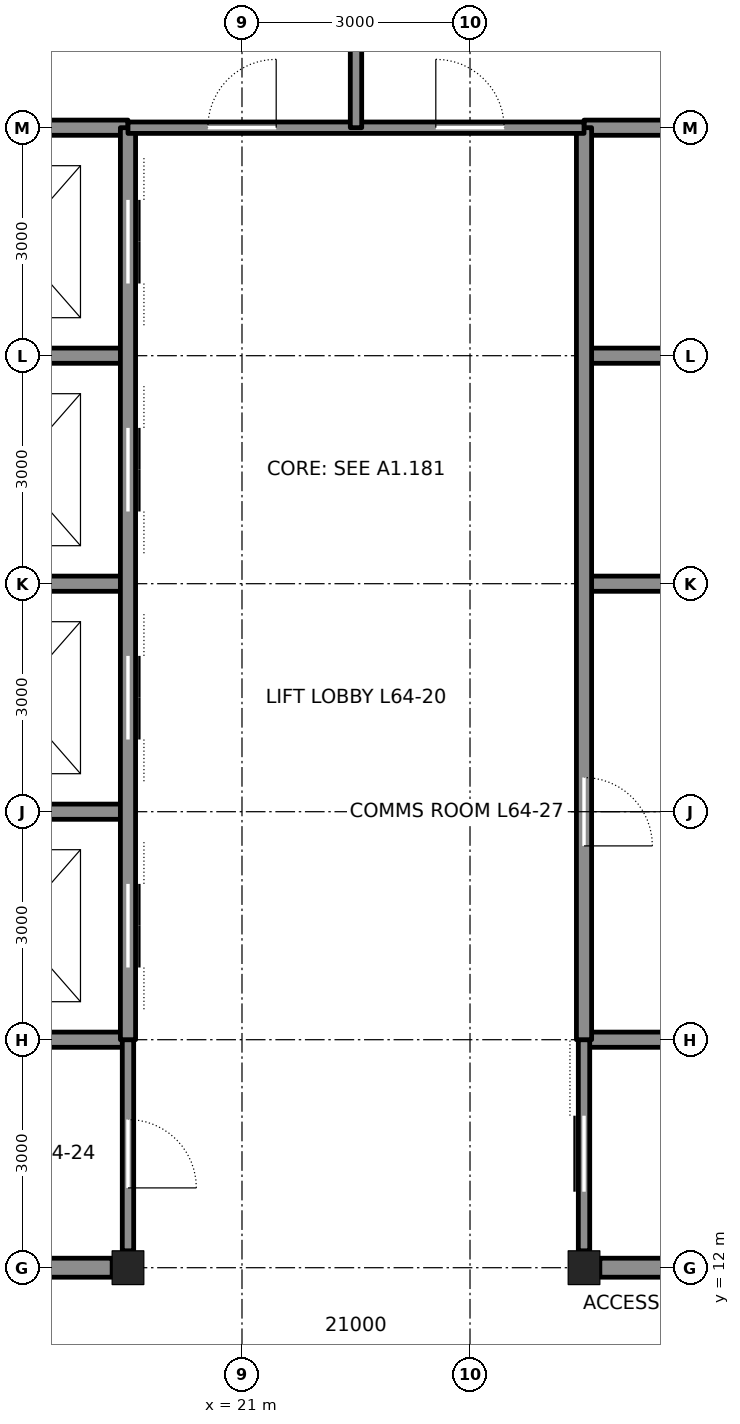
"""IFC4 building model, lengths in metres.
Left out: names, types, materials, properties, quantities, classifications, styles, units other than length and angle.
Written with IfcOpenShell. Run it as: python <this file> out.ifc"""

import sys

from ifc_helpers import new_model, si_unit, direction, frame, frame_2d, origin, origin_2d, place, context, subcontext, project, spatial, rectangle, i_section, extrude, element, fill, save


model = new_model("IFC4")
c1 = context("Model", 3, precision=1e-05, world=origin(), true_north=direction((0.0, 1.0)))
c2 = subcontext(c1, "Body", "Model", "MODEL_VIEW")
j1 = project(units=[si_unit("LENGTHUNIT", "METRE"), si_unit("PLANEANGLEUNIT", "RADIAN")], contexts=[c1])
p1 = place(None, origin())
s1 = spatial("IfcSite", under=j1, at=p1, CompositionType="ELEMENT")
p2 = place(p1, origin())
s2 = spatial("IfcBuilding", under=s1, at=p2, CompositionType="ELEMENT")
p3 = place(p2, frame((0.0, 0.0, 287.4)))
s3 = spatial("IfcBuildingStorey", under=s2, at=p3, CompositionType="ELEMENT", Elevation=287.4)
for number, where, z_axis, x_axis in (
    (1, (19.5, 12.0, 0.0), (0.0, 0.0, 1.0), (1.0, 0.0, 0.0)),
    (2, (25.5, 12.0, 0.0), (0.0, 0.0, 1.0), (1.0, 0.0, 0.0)),
):
    element("IfcColumn", number, at=place(p3, frame(where, z_axis=z_axis, x_axis=x_axis)), inside=s3, PredefinedType="COLUMN", context=c2, shape_type="SweptSolid", body=[
        extrude(i_section(OverallWidth=0.417, OverallDepth=0.445, WebThickness=0.039, FlangeThickness=0.063, at=origin_2d()), origin(), (0.0, 0.0, 1.0), 4.2),
    ])
for number, where, z_axis, x_axis in (
    (3, (16.708, 12.0, 0.0), (0.0, 0.0, 1.0), (1.0, 0.0, 0.0)),
    (4, (25.708, 12.0, 0.0), (0.0, 0.0, 1.0), (1.0, 0.0, 0.0)),
):
    element("IfcWall", number, at=place(p3, frame(where, z_axis=z_axis, x_axis=x_axis)), inside=s3, PredefinedType="SOLIDWALL", context=c2, shape_type="SweptSolid", body=[
        extrude(rectangle(XDim=2.583, YDim=0.25, at=frame_2d((1.292, 0.0))), origin(), (0.0, 0.0, 1.0), 3.182),
    ])
for number, where, z_axis, x_axis in (
    (5, (12.0, 15.0, 0.0), (0.0, 0.0, 1.0), (1.0, 0.0, 0.0)),
    (6, (25.5, 15.0, 0.0), (0.0, 0.0, 1.0), (1.0, 0.0, 0.0)),
):
    element("IfcWall", number, at=place(p3, frame(where, z_axis=z_axis, x_axis=x_axis)), inside=s3, PredefinedType="SOLIDWALL", context=c2, shape_type="SweptSolid", body=[
        extrude(rectangle(XDim=7.5, YDim=0.2, at=frame_2d((3.75, 0.0))), origin(), (0.0, 0.0, 1.0), 4.04),
    ])
for number, where, z_axis, x_axis in (
    (7, (16.708, 24.0, 0.0), (0.0, 0.0, 1.0), (1.0, 0.0, 0.0)),
    (8, (25.5, 24.0, 0.0), (0.0, 0.0, 1.0), (1.0, 0.0, 0.0)),
):
    element("IfcWall", number, at=place(p3, frame(where, z_axis=z_axis, x_axis=x_axis)), inside=s3, PredefinedType="SOLIDWALL", context=c2, shape_type="SweptSolid", body=[
        extrude(rectangle(XDim=2.792, YDim=0.2, at=frame_2d((1.396, 0.0))), origin(), (0.0, 0.0, 1.0), 3.09),
    ])
p4 = place(p3, frame((12.0, 27.0, 0.0), z_axis=(0.0, 0.0, 1.0), x_axis=(1.0, 0.0, 0.0)))
e9 = element("IfcWall", 9, at=p4, inside=s3, PredefinedType="SOLIDWALL", context=c2, shape_type="SweptSolid", body=[
    extrude(rectangle(XDim=7.5, YDim=0.2, at=frame_2d((3.75, 0.0))), origin(), (0.0, 0.0, 1.0), 4.04),
])
p5 = place(p4, frame((1.65, 0.0, 0.0)))
e10 = element("IfcOpeningElement", 10, at=p5, cuts=e9, PredefinedType="OPENING", context=c2, shape_type="SweptSolid", body=[
    extrude(rectangle(XDim=1.2, YDim=2.1, at=frame_2d((0.6, 1.05))), frame((0.0, 0.11, 0.0), z_axis=(0.0, -1.0, 0.0), x_axis=(1.0, 0.0, 0.0)), (0.0, 0.0, 1.0), 0.22),
])
for number, where, z_axis, x_axis in (
    (11, (25.5, 27.0, 0.0), (0.0, 0.0, 1.0), (1.0, 0.0, 0.0)),
    (12, (16.5, 18.0, 0.0), (0.0, 0.0, 1.0), (1.0, 0.0, 0.0)),
):
    element("IfcWall", number, at=place(p3, frame(where, z_axis=z_axis, x_axis=x_axis)), inside=s3, PredefinedType="SOLIDWALL", context=c2, shape_type="SweptSolid", body=[
        extrude(rectangle(XDim=3.0, YDim=0.2, at=frame_2d((1.5, 0.0))), origin(), (0.0, 0.0, 1.0), 4.04),
    ])
for number, where, z_axis, x_axis in (
    (13, (16.708, 21.0, 0.0), (0.0, 0.0, 1.0), (1.0, 0.0, 0.0)),
    (14, (25.5, 21.0, 0.0), (0.0, 0.0, 1.0), (1.0, 0.0, 0.0)),
):
    element("IfcWall", number, at=place(p3, frame(where, z_axis=z_axis, x_axis=x_axis)), inside=s3, PredefinedType="SOLIDWALL", context=c2, shape_type="SweptSolid", body=[
        extrude(rectangle(XDim=2.792, YDim=0.2, at=frame_2d((1.396, 0.0))), origin(), (0.0, 0.0, 1.0), 3.09),
    ])
p6 = place(p3, frame((19.5, 12.222, 0.0), z_axis=(0.0, 0.0, 1.0), x_axis=(0.0, 1.0, 0.0)))
e15 = element("IfcWall", 15, at=p6, inside=s3, PredefinedType="PARTITIONING", context=c2, shape_type="SweptSolid", body=[
    extrude(rectangle(XDim=2.778, YDim=0.15, at=frame_2d((1.389, 0.0))), origin(), (0.0, 0.0, 1.0), 3.065),
])
p7 = place(p6, frame((0.828, 0.0, 0.0)))
e16 = element("IfcOpeningElement", 16, at=p7, cuts=e15, PredefinedType="OPENING", context=c2, shape_type="SweptSolid", body=[
    extrude(rectangle(XDim=0.9, YDim=2.1, at=frame_2d((0.45, 1.05))), frame((0.0, 0.085, 0.0), z_axis=(0.0, -1.0, 0.0), x_axis=(1.0, 0.0, 0.0)), (0.0, 0.0, 1.0), 0.17),
])
p8 = place(p3, frame((19.5, 15.0, 0.0), z_axis=(0.0, 0.0, 1.0), x_axis=(0.0, 1.0, 0.0)))
e17 = element("IfcWall", 17, at=p8, inside=s3, PredefinedType="SOLIDWALL", context=c2, shape_type="SweptSolid", body=[
    extrude(rectangle(XDim=12.0, YDim=0.2, at=frame_2d((6.0, 0.0))), origin(), (0.0, 0.0, 1.0), 3.065),
])
p9 = place(p8, frame((0.95, 0.0, 0.0)))
e18 = element("IfcOpeningElement", 18, at=p9, cuts=e17, PredefinedType="OPENING", context=c2, shape_type="SweptSolid", body=[
    extrude(rectangle(XDim=1.1, YDim=2.1, at=frame_2d((0.55, 1.05))), frame((0.0, 0.11, 0.0), z_axis=(0.0, -1.0, 0.0), x_axis=(1.0, 0.0, 0.0)), (0.0, 0.0, 1.0), 0.22),
])
p10 = place(p8, frame((3.95, 0.0, 0.0)))
e19 = element("IfcOpeningElement", 19, at=p10, cuts=e17, PredefinedType="OPENING", context=c2, shape_type="SweptSolid", body=[
    extrude(rectangle(XDim=1.1, YDim=2.1, at=frame_2d((0.55, 1.05))), frame((0.0, 0.11, 0.0), z_axis=(0.0, -1.0, 0.0), x_axis=(1.0, 0.0, 0.0)), (0.0, 0.0, 1.0), 0.22),
])
p11 = place(p8, frame((6.95, 0.0, 0.0)))
e20 = element("IfcOpeningElement", 20, at=p11, cuts=e17, PredefinedType="OPENING", context=c2, shape_type="SweptSolid", body=[
    extrude(rectangle(XDim=1.1, YDim=2.1, at=frame_2d((0.55, 1.05))), frame((0.0, 0.11, 0.0), z_axis=(0.0, -1.0, 0.0), x_axis=(1.0, 0.0, 0.0)), (0.0, 0.0, 1.0), 0.22),
])
p12 = place(p8, frame((9.95, 0.0, 0.0)))
e21 = element("IfcOpeningElement", 21, at=p12, cuts=e17, PredefinedType="OPENING", context=c2, shape_type="SweptSolid", body=[
    extrude(rectangle(XDim=1.1, YDim=2.1, at=frame_2d((0.55, 1.05))), frame((0.0, 0.11, 0.0), z_axis=(0.0, -1.0, 0.0), x_axis=(1.0, 0.0, 0.0)), (0.0, 0.0, 1.0), 0.22),
])
p13 = place(p3, frame((25.5, 12.222, 0.0), z_axis=(0.0, 0.0, 1.0), x_axis=(0.0, 1.0, 0.0)))
e22 = element("IfcWall", 22, at=p13, inside=s3, PredefinedType="PARTITIONING", context=c2, shape_type="SweptSolid", body=[
    extrude(rectangle(XDim=2.778, YDim=0.15, at=frame_2d((1.389, 0.0))), origin(), (0.0, 0.0, 1.0), 3.065),
])
p14 = place(p13, frame((0.778, 0.0, 0.0)))
e23 = element("IfcOpeningElement", 23, at=p14, cuts=e22, PredefinedType="OPENING", context=c2, shape_type="SweptSolid", body=[
    extrude(rectangle(XDim=1.0, YDim=2.1, at=frame_2d((0.5, 1.05))), frame((0.0, 0.085, 0.0), z_axis=(0.0, -1.0, 0.0), x_axis=(1.0, 0.0, 0.0)), (0.0, 0.0, 1.0), 0.17),
])
p15 = place(p3, frame((25.5, 15.0, 0.0), z_axis=(0.0, 0.0, 1.0), x_axis=(0.0, 1.0, 0.0)))
e24 = element("IfcWall", 24, at=p15, inside=s3, PredefinedType="SOLIDWALL", context=c2, shape_type="SweptSolid", body=[
    extrude(rectangle(XDim=12.0, YDim=0.2, at=frame_2d((6.0, 0.0))), origin(), (0.0, 0.0, 1.0), 3.065),
])
p16 = place(p15, frame((2.55, 0.0, 0.0)))
e25 = element("IfcOpeningElement", 25, at=p16, cuts=e24, PredefinedType="OPENING", context=c2, shape_type="SweptSolid", body=[
    extrude(rectangle(XDim=0.9, YDim=2.1, at=frame_2d((0.45, 1.05))), frame((0.0, 0.11, 0.0), z_axis=(0.0, -1.0, 0.0), x_axis=(1.0, 0.0, 0.0)), (0.0, 0.0, 1.0), 0.22),
])
p17 = place(p3, frame((19.5, 27.0, 0.0), z_axis=(0.0, 0.0, 1.0), x_axis=(1.0, 0.0, 0.0)))
e26 = element("IfcWall", 26, at=p17, inside=s3, PredefinedType="PARTITIONING", context=c2, shape_type="SweptSolid", body=[
    extrude(rectangle(XDim=6.0, YDim=0.15, at=frame_2d((3.0, 0.0))), origin(), (0.0, 0.0, 1.0), 4.04),
])
p18 = place(p17, frame((1.05, 0.0, 0.0)))
e27 = element("IfcOpeningElement", 27, at=p18, cuts=e26, PredefinedType="OPENING", context=c2, shape_type="SweptSolid", body=[
    extrude(rectangle(XDim=0.9, YDim=2.1, at=frame_2d((0.45, 1.05))), frame((0.0, 0.085, 0.0), z_axis=(0.0, -1.0, 0.0), x_axis=(1.0, 0.0, 0.0)), (0.0, 0.0, 1.0), 0.17),
])
p19 = place(p17, frame((4.05, 0.0, 0.0)))
e28 = element("IfcOpeningElement", 28, at=p19, cuts=e26, PredefinedType="OPENING", context=c2, shape_type="SweptSolid", body=[
    extrude(rectangle(XDim=0.9, YDim=2.1, at=frame_2d((0.45, 1.05))), frame((0.0, 0.085, 0.0), z_axis=(0.0, -1.0, 0.0), x_axis=(1.0, 0.0, 0.0)), (0.0, 0.0, 1.0), 0.17),
])
p20 = place(p3, frame((22.5, 27.0, 0.0), z_axis=(0.0, 0.0, 1.0), x_axis=(0.0, 1.0, 0.0)))
e29 = element("IfcWall", 29, at=p20, inside=s3, PredefinedType="PARTITIONING", context=c2, shape_type="SweptSolid", body=[
    extrude(rectangle(XDim=6.0, YDim=0.15, at=frame_2d((3.0, 0.0))), origin(), (0.0, 0.0, 1.0), 4.04),
])
p21 = place(p18, origin())
e30 = element("IfcDoor", 30, at=p21, inside=s3, OperationType="SINGLE_SWING_RIGHT", PredefinedType="DOOR", context=c2, shape_type="SweptSolid", body=[
    extrude(rectangle(XDim=0.9, YDim=2.1, at=frame_2d((0.45, 1.05))), frame((0.0, 0.025, 0.0), z_axis=(0.0, -1.0, 0.0), x_axis=(1.0, 0.0, 0.0)), (0.0, 0.0, 1.0), 0.05),
])
fill(e27, e30)
p22 = place(p19, origin())
e31 = element("IfcDoor", 31, at=p22, inside=s3, OperationType="SINGLE_SWING_LEFT", PredefinedType="DOOR", context=c2, shape_type="SweptSolid", body=[
    extrude(rectangle(XDim=0.9, YDim=2.1, at=frame_2d((0.45, 1.05))), frame((0.0, 0.025, 0.0), z_axis=(0.0, -1.0, 0.0), x_axis=(1.0, 0.0, 0.0)), (0.0, 0.0, 1.0), 0.05),
])
fill(e28, e31)
p23 = place(p14, origin())
e32 = element("IfcDoor", 32, at=p23, inside=s3, OperationType="SLIDING_TO_LEFT", PredefinedType="DOOR", context=c2, shape_type="SweptSolid", body=[
    extrude(rectangle(XDim=1.0, YDim=2.1, at=frame_2d((0.5, 1.05))), frame((0.0, 0.025, 0.0), z_axis=(0.0, -1.0, 0.0), x_axis=(1.0, 0.0, 0.0)), (0.0, 0.0, 1.0), 0.05),
])
fill(e23, e32)
p24 = place(p16, frame((0.9, 0.0, 0.0), z_axis=(0.0, 0.0, 1.0), x_axis=(-1.0, 0.0, 0.0)))
e33 = element("IfcDoor", 33, at=p24, inside=s3, OperationType="SINGLE_SWING_RIGHT", PredefinedType="DOOR", context=c2, shape_type="SweptSolid", body=[
    extrude(rectangle(XDim=0.9, YDim=2.1, at=frame_2d((0.45, 1.05))), frame((0.0, 0.025, 0.0), z_axis=(0.0, -1.0, 0.0), x_axis=(1.0, 0.0, 0.0)), (0.0, 0.0, 1.0), 0.05),
])
fill(e25, e33)
p25 = place(p7, frame((0.9, 0.0, 0.0), z_axis=(0.0, 0.0, 1.0), x_axis=(-1.0, 0.0, 0.0)))
e34 = element("IfcDoor", 34, at=p25, inside=s3, OperationType="SINGLE_SWING_RIGHT", PredefinedType="DOOR", context=c2, shape_type="SweptSolid", body=[
    extrude(rectangle(XDim=0.9, YDim=2.1, at=frame_2d((0.45, 1.05))), frame((0.0, 0.025, 0.0), z_axis=(0.0, -1.0, 0.0), x_axis=(1.0, 0.0, 0.0)), (0.0, 0.0, 1.0), 0.05),
])
fill(e16, e34)
p26 = place(p9, origin())
e35 = element("IfcDoor", 35, at=p26, inside=s3, OperationType="DOUBLE_DOOR_SLIDING", PredefinedType="DOOR", context=c2, shape_type="SweptSolid", body=[
    extrude(rectangle(XDim=1.1, YDim=2.1, at=frame_2d((0.55, 1.05))), frame((0.0, 0.025, 0.0), z_axis=(0.0, -1.0, 0.0), x_axis=(1.0, 0.0, 0.0)), (0.0, 0.0, 1.0), 0.05),
])
fill(e18, e35)
p27 = place(p10, origin())
e36 = element("IfcDoor", 36, at=p27, inside=s3, OperationType="DOUBLE_DOOR_SLIDING", PredefinedType="DOOR", context=c2, shape_type="SweptSolid", body=[
    extrude(rectangle(XDim=1.1, YDim=2.1, at=frame_2d((0.55, 1.05))), frame((0.0, 0.025, 0.0), z_axis=(0.0, -1.0, 0.0), x_axis=(1.0, 0.0, 0.0)), (0.0, 0.0, 1.0), 0.05),
])
fill(e19, e36)
p28 = place(p11, origin())
e37 = element("IfcDoor", 37, at=p28, inside=s3, OperationType="DOUBLE_DOOR_SLIDING", PredefinedType="DOOR", context=c2, shape_type="SweptSolid", body=[
    extrude(rectangle(XDim=1.1, YDim=2.1, at=frame_2d((0.55, 1.05))), frame((0.0, 0.025, 0.0), z_axis=(0.0, -1.0, 0.0), x_axis=(1.0, 0.0, 0.0)), (0.0, 0.0, 1.0), 0.05),
])
fill(e20, e37)
p29 = place(p12, origin())
e38 = element("IfcDoor", 38, at=p29, inside=s3, OperationType="DOUBLE_DOOR_SLIDING", PredefinedType="DOOR", context=c2, shape_type="SweptSolid", body=[
    extrude(rectangle(XDim=1.1, YDim=2.1, at=frame_2d((0.55, 1.05))), frame((0.0, 0.025, 0.0), z_axis=(0.0, -1.0, 0.0), x_axis=(1.0, 0.0, 0.0)), (0.0, 0.0, 1.0), 0.05),
])
fill(e21, e38)
save(model, sys.argv[1])
